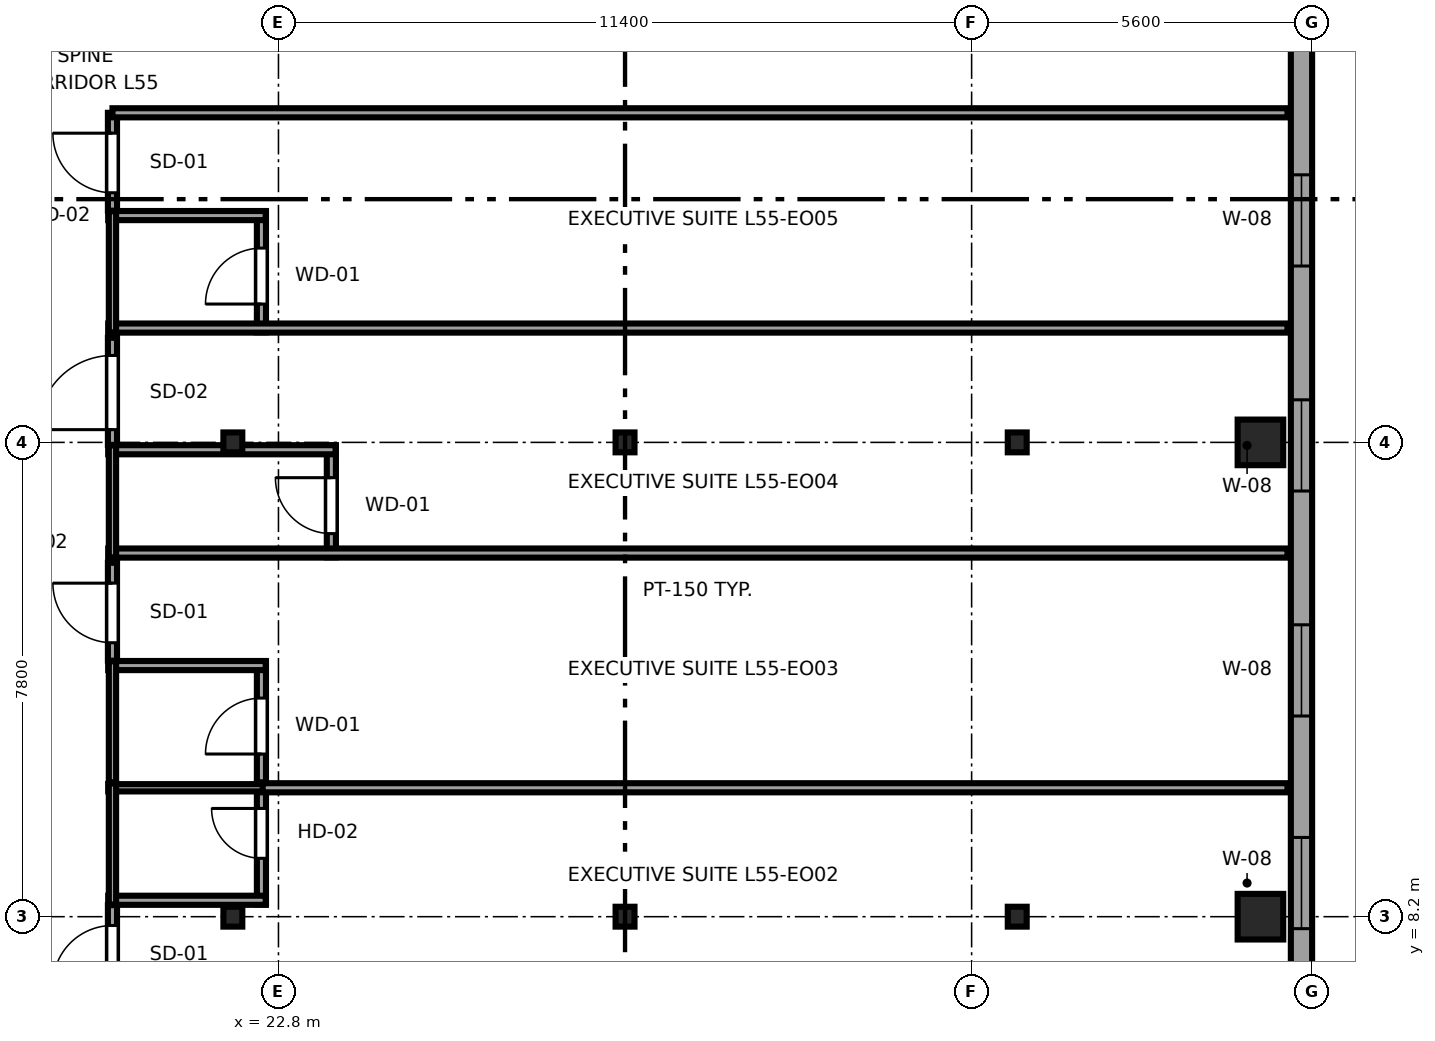
"""IFC4 building model, lengths in metres.
Left out: names, types, materials, properties, quantities, classifications, styles, units other than length and angle.
Written with IfcOpenShell. Run it as: python <this file> out.ifc"""

import sys

from ifc_helpers import new_model, si_unit, direction, frame, frame_2d, origin, origin_2d, place, context, subcontext, project, spatial, rectangle, i_section, extrude, source, transform, mapped, element, fill, save


model = new_model("IFC4")
c1 = context("Model", 3, precision=1e-05, world=origin(), true_north=direction((0.0, 1.0)))
c2 = subcontext(c1, "Body", "Model", "MODEL_VIEW")
j1 = project(units=[si_unit("LENGTHUNIT", "METRE"), si_unit("PLANEANGLEUNIT", "RADIAN")], contexts=[c1])
p1 = place(None, origin())
s1 = spatial("IfcSite", under=j1, at=p1, CompositionType="ELEMENT")
p2 = place(p1, origin())
s2 = spatial("IfcBuilding", under=s1, at=p2, CompositionType="ELEMENT")
p3 = place(p2, frame((0.0, 0.0, 209.7)))
s3 = spatial("IfcBuildingStorey", under=s2, at=p3, CompositionType="ELEMENT", Elevation=209.7)
m1 = source(origin(), c2, "Body", "SweptSolid", [
    extrude(i_section(OverallWidth=0.311, OverallDepth=0.327, WebThickness=0.016, FlangeThickness=0.025, FilletRadius=0.017, at=origin_2d()), origin(), (0.0, 0.0, 1.0), 3.55),
])
for number, where, z_axis, x_axis in (
    (1, (22.05, 8.2, 0.0), (0.0, 0.0, 1.0), (1.0, 0.0, 0.0)),
    (2, (22.05, 16.0, 0.0), (0.0, 0.0, 1.0), (1.0, 0.0, 0.0)),
    (3, (28.5, 8.2, 0.0), (0.0, 0.0, 1.0), (1.0, 0.0, 0.0)),
    (4, (28.5, 16.0, 0.0), (0.0, 0.0, 1.0), (1.0, 0.0, 0.0)),
    (5, (34.95, 8.2, 0.0), (0.0, 0.0, 1.0), (1.0, 0.0, 0.0)),
    (6, (34.95, 16.0, 0.0), (0.0, 0.0, 1.0), (1.0, 0.0, 0.0)),
):
    element("IfcColumn", number, at=place(p3, frame(where, z_axis=z_axis, x_axis=x_axis)), inside=s3, PredefinedType="COLUMN", context=c2, shape_type="MappedRepresentation", body=[
        mapped(m1, transform((0.0, 0.0, 0.0), x_axis=(1.0, 0.0, 0.0), y_axis=(0.0, 1.0, 0.0), z_axis=(0.0, 0.0, 1.0), scale=1.0)),
    ])
m2 = source(origin(), c2, "Body", "SweptSolid", [
    extrude(rectangle(XDim=0.75, YDim=0.75, at=origin_2d()), origin(), (0.0, 0.0, 1.0), 3.55),
])
for number, where, z_axis, x_axis in (
    (7, (38.95, 8.2, 0.0), (0.0, 0.0, 1.0), (1.0, 0.0, 0.0)),
    (8, (38.95, 16.0, 0.0), (0.0, 0.0, 1.0), (1.0, 0.0, 0.0)),
):
    element("IfcColumn", number, at=place(p3, frame(where, z_axis=z_axis, x_axis=x_axis)), inside=s3, PredefinedType="COLUMN", context=c2, shape_type="MappedRepresentation", body=[
        mapped(m2, transform((0.0, 0.0, 0.0), x_axis=(1.0, 0.0, 0.0), y_axis=(0.0, 1.0, 0.0), z_axis=(0.0, 0.0, 1.0), scale=1.0)),
    ])
p4 = place(p3, frame((39.625, 7.017, 0.0), z_axis=(0.0, 0.0, 1.0), x_axis=(0.0, 1.0, 0.0)))
e9 = element("IfcWall", 9, at=p4, inside=s3, PredefinedType="SOLIDWALL", context=c2, shape_type="SweptSolid", body=[
    extrude(rectangle(XDim=24.579, YDim=0.35, at=frame_2d((12.29, 0.0))), origin(), (0.0, 0.0, 1.0), 3.37),
])
p5 = place(p4, frame((20.291, 0.0, 0.68)))
e10 = element("IfcOpeningElement", 10, at=p5, cuts=e9, PredefinedType="OPENING", context=c2, shape_type="SweptSolid", body=[
    extrude(rectangle(XDim=2.7, YDim=1.95, at=frame_2d((1.35, 0.975))), frame((0.0, 0.185, 0.0), z_axis=(0.0, -1.0, 0.0), x_axis=(1.0, 0.0, 0.0)), (0.0, 0.0, 1.0), 0.37),
])
p6 = place(p4, frame((0.986, 0.0, 0.62)))
e11 = element("IfcOpeningElement", 11, at=p6, cuts=e9, PredefinedType="OPENING", context=c2, shape_type="SweptSolid", body=[
    extrude(rectangle(XDim=1.5, YDim=1.55, at=frame_2d((0.75, 0.775))), frame((0.0, 0.185, 0.0), z_axis=(0.0, -1.0, 0.0), x_axis=(1.0, 0.0, 0.0)), (0.0, 0.0, 1.0), 0.37),
])
p7 = place(p4, frame((4.483, 0.0, 0.62)))
e12 = element("IfcOpeningElement", 12, at=p7, cuts=e9, PredefinedType="OPENING", context=c2, shape_type="SweptSolid", body=[
    extrude(rectangle(XDim=1.5, YDim=1.55, at=frame_2d((0.75, 0.775))), frame((0.0, 0.185, 0.0), z_axis=(0.0, -1.0, 0.0), x_axis=(1.0, 0.0, 0.0)), (0.0, 0.0, 1.0), 0.37),
])
p8 = place(p4, frame((8.183, 0.0, 0.62)))
e13 = element("IfcOpeningElement", 13, at=p8, cuts=e9, PredefinedType="OPENING", context=c2, shape_type="SweptSolid", body=[
    extrude(rectangle(XDim=1.5, YDim=1.55, at=frame_2d((0.75, 0.775))), frame((0.0, 0.185, 0.0), z_axis=(0.0, -1.0, 0.0), x_axis=(1.0, 0.0, 0.0)), (0.0, 0.0, 1.0), 0.37),
])
p9 = place(p4, frame((11.883, 0.0, 0.62)))
e14 = element("IfcOpeningElement", 14, at=p9, cuts=e9, PredefinedType="OPENING", context=c2, shape_type="SweptSolid", body=[
    extrude(rectangle(XDim=1.5, YDim=1.55, at=frame_2d((0.75, 0.775))), frame((0.0, 0.185, 0.0), z_axis=(0.0, -1.0, 0.0), x_axis=(1.0, 0.0, 0.0)), (0.0, 0.0, 1.0), 0.37),
])
p10 = place(p3, frame((22.52, 8.4, 0.0), z_axis=(0.0, 0.0, 1.0), x_axis=(0.0, 1.0, 0.0)))
e15 = element("IfcWall", 15, at=p10, inside=s3, PredefinedType="PARTITIONING", context=c2, shape_type="SweptSolid", body=[
    extrude(rectangle(XDim=1.99, YDim=0.15, at=frame_2d((0.995, 0.0))), origin(), (0.0, 0.0, 1.0), 3.37),
])
p11 = place(p10, frame((0.76, 0.0, 0.0)))
e16 = element("IfcOpeningElement", 16, at=p11, cuts=e15, PredefinedType="OPENING", context=c2, shape_type="SweptSolid", body=[
    extrude(rectangle(XDim=0.82, YDim=2.01, at=frame_2d((0.41, 1.005))), frame((0.0, 0.085, 0.0), z_axis=(0.0, -1.0, 0.0), x_axis=(1.0, 0.0, 0.0)), (0.0, 0.0, 1.0), 0.17),
])
p12 = place(p3, frame((20.0, 8.47, 0.0), z_axis=(0.0, 0.0, 1.0), x_axis=(1.0, 0.0, 0.0)))
e17 = element("IfcWall", 17, at=p12, inside=s3, PredefinedType="PARTITIONING", context=c2, shape_type="SweptSolid", body=[
    extrude(rectangle(XDim=2.59, YDim=0.15, at=frame_2d((1.295, 0.0))), origin(), (0.0, 0.0, 1.0), 3.37),
])
p13 = place(p3, frame((20.0, 10.32, 0.0), z_axis=(0.0, 0.0, 1.0), x_axis=(1.0, 0.0, 0.0)))
e18 = element("IfcWall", 18, at=p13, inside=s3, PredefinedType="PLUMBINGWALL", context=c2, shape_type="SweptSolid", body=[
    extrude(rectangle(XDim=2.59, YDim=0.12, at=frame_2d((1.295, 0.0))), origin(), (0.0, 0.0, 1.0), 3.37),
])
p14 = place(p3, frame((20.07, 8.4, 0.0), z_axis=(0.0, 0.0, 1.0), x_axis=(0.0, 1.0, 0.0)))
e19 = element("IfcWall", 19, at=p14, inside=s3, PredefinedType="PLUMBINGWALL", context=c2, shape_type="SweptSolid", body=[
    extrude(rectangle(XDim=1.99, YDim=0.12, at=frame_2d((0.995, 0.0))), origin(), (0.0, 0.0, 1.0), 3.37),
])
p15 = place(p3, frame((22.52, 10.41, 0.0), z_axis=(0.0, 0.0, 1.0), x_axis=(0.0, 1.0, 0.0)))
e20 = element("IfcWall", 20, at=p15, inside=s3, PredefinedType="PARTITIONING", context=c2, shape_type="SweptSolid", body=[
    extrude(rectangle(XDim=1.99, YDim=0.15, at=frame_2d((0.995, 0.0))), origin(), (0.0, 0.0, 1.0), 3.37),
])
p16 = place(p15, frame((0.465, 0.0, 0.0)))
e21 = element("IfcOpeningElement", 21, at=p16, cuts=e20, PredefinedType="OPENING", context=c2, shape_type="SweptSolid", body=[
    extrude(rectangle(XDim=0.92, YDim=2.01, at=frame_2d((0.46, 1.005))), frame((0.0, 0.085, 0.0), z_axis=(0.0, -1.0, 0.0), x_axis=(1.0, 0.0, 0.0)), (0.0, 0.0, 1.0), 0.17),
])
p17 = place(p3, frame((20.0, 12.33, 0.0), z_axis=(0.0, 0.0, 1.0), x_axis=(1.0, 0.0, 0.0)))
e22 = element("IfcWall", 22, at=p17, inside=s3, PredefinedType="PARTITIONING", context=c2, shape_type="SweptSolid", body=[
    extrude(rectangle(XDim=2.59, YDim=0.15, at=frame_2d((1.295, 0.0))), origin(), (0.0, 0.0, 1.0), 3.37),
])
p18 = place(p3, frame((20.07, 10.41, 0.0), z_axis=(0.0, 0.0, 1.0), x_axis=(0.0, 1.0, 0.0)))
e23 = element("IfcWall", 23, at=p18, inside=s3, PredefinedType="PLUMBINGWALL", context=c2, shape_type="SweptSolid", body=[
    extrude(rectangle(XDim=1.99, YDim=0.12, at=frame_2d((0.995, 0.0))), origin(), (0.0, 0.0, 1.0), 3.37),
])
p19 = place(p3, frame((23.67, 14.11, 0.0), z_axis=(0.0, 0.0, 1.0), x_axis=(0.0, 1.0, 0.0)))
e24 = element("IfcWall", 24, at=p19, inside=s3, PredefinedType="PARTITIONING", context=c2, shape_type="SweptSolid", body=[
    extrude(rectangle(XDim=1.839, YDim=0.15, at=frame_2d((0.919, 0.0))), origin(), (0.0, 0.0, 1.0), 3.37),
])
p20 = place(p19, frame((0.389, 0.0, 0.0)))
e25 = element("IfcOpeningElement", 25, at=p20, cuts=e24, PredefinedType="OPENING", context=c2, shape_type="SweptSolid", body=[
    extrude(rectangle(XDim=0.92, YDim=2.01, at=frame_2d((0.46, 1.005))), frame((0.0, 0.085, 0.0), z_axis=(0.0, -1.0, 0.0), x_axis=(1.0, 0.0, 0.0)), (0.0, 0.0, 1.0), 0.17),
])
p21 = place(p3, frame((20.0, 14.18, 0.0), z_axis=(0.0, 0.0, 1.0), x_axis=(1.0, 0.0, 0.0)))
e26 = element("IfcWall", 26, at=p21, inside=s3, PredefinedType="PARTITIONING", context=c2, shape_type="SweptSolid", body=[
    extrude(rectangle(XDim=19.395, YDim=0.15, at=frame_2d((9.698, 0.0))), origin(), (0.0, 0.0, 1.0), 3.37),
])
p22 = place(p3, frame((20.0, 15.879, 0.0), z_axis=(0.0, 0.0, 1.0), x_axis=(1.0, 0.0, 0.0)))
e27 = element("IfcWall", 27, at=p22, inside=s3, PredefinedType="PARTITIONING", context=c2, shape_type="SweptSolid", body=[
    extrude(rectangle(XDim=3.74, YDim=0.15, at=frame_2d((1.87, 0.0))), origin(), (0.0, 0.0, 1.0), 2.758),
])
p23 = place(p3, frame((20.07, 14.11, 0.0), z_axis=(0.0, 0.0, 1.0), x_axis=(0.0, 1.0, 0.0)))
e28 = element("IfcWall", 28, at=p23, inside=s3, PredefinedType="PLUMBINGWALL", context=c2, shape_type="SweptSolid", body=[
    extrude(rectangle(XDim=1.839, YDim=0.12, at=frame_2d((0.919, 0.0))), origin(), (0.0, 0.0, 1.0), 3.37),
])
p24 = place(p3, frame((22.52, 17.81, 0.0), z_axis=(0.0, 0.0, 1.0), x_axis=(0.0, 1.0, 0.0)))
e29 = element("IfcWall", 29, at=p24, inside=s3, PredefinedType="PARTITIONING", context=c2, shape_type="SweptSolid", body=[
    extrude(rectangle(XDim=1.99, YDim=0.15, at=frame_2d((0.995, 0.0))), origin(), (0.0, 0.0, 1.0), 3.37),
])
p25 = place(p24, frame((0.465, 0.0, 0.0)))
e30 = element("IfcOpeningElement", 30, at=p25, cuts=e29, PredefinedType="OPENING", context=c2, shape_type="SweptSolid", body=[
    extrude(rectangle(XDim=0.92, YDim=2.01, at=frame_2d((0.46, 1.005))), frame((0.0, 0.085, 0.0), z_axis=(0.0, -1.0, 0.0), x_axis=(1.0, 0.0, 0.0)), (0.0, 0.0, 1.0), 0.17),
])
p26 = place(p3, frame((20.0, 17.88, 0.0), z_axis=(0.0, 0.0, 1.0), x_axis=(1.0, 0.0, 0.0)))
e31 = element("IfcWall", 31, at=p26, inside=s3, PredefinedType="PARTITIONING", context=c2, shape_type="SweptSolid", body=[
    extrude(rectangle(XDim=19.395, YDim=0.15, at=frame_2d((9.698, 0.0))), origin(), (0.0, 0.0, 1.0), 3.37),
])
p27 = place(p3, frame((20.0, 19.73, 0.0), z_axis=(0.0, 0.0, 1.0), x_axis=(1.0, 0.0, 0.0)))
e32 = element("IfcWall", 32, at=p27, inside=s3, PredefinedType="PARTITIONING", context=c2, shape_type="SweptSolid", body=[
    extrude(rectangle(XDim=2.59, YDim=0.15, at=frame_2d((1.295, 0.0))), origin(), (0.0, 0.0, 1.0), 3.37),
])
p28 = place(p3, frame((20.07, 17.81, 0.0), z_axis=(0.0, 0.0, 1.0), x_axis=(0.0, 1.0, 0.0)))
e33 = element("IfcWall", 33, at=p28, inside=s3, PredefinedType="PLUMBINGWALL", context=c2, shape_type="SweptSolid", body=[
    extrude(rectangle(XDim=1.99, YDim=0.12, at=frame_2d((0.995, 0.0))), origin(), (0.0, 0.0, 1.0), 3.37),
])
p29 = place(p3, frame((20.07, 6.78, 0.0), z_axis=(0.0, 0.0, 1.0), x_axis=(0.0, 1.0, 0.0)))
e34 = element("IfcWall", 34, at=p29, inside=s3, PredefinedType="PARTITIONING", context=c2, shape_type="SweptSolid", body=[
    extrude(rectangle(XDim=1.61, YDim=0.15, at=frame_2d((0.805, 0.0))), origin(), (0.0, 0.0, 1.0), 3.37),
])
p30 = place(p29, frame((0.295, 0.0, 0.0)))
e35 = element("IfcOpeningElement", 35, at=p30, cuts=e34, PredefinedType="OPENING", context=c2, shape_type="SweptSolid", body=[
    extrude(rectangle(XDim=0.98, YDim=2.12, at=frame_2d((0.49, 1.06))), frame((0.0, 0.085, 0.0), z_axis=(0.0, -1.0, 0.0), x_axis=(1.0, 0.0, 0.0)), (0.0, 0.0, 1.0), 0.17),
])
p31 = place(p3, frame((22.54, 10.32, 0.0), z_axis=(0.0, 0.0, 1.0), x_axis=(1.0, 0.0, 0.0)))
e36 = element("IfcWall", 36, at=p31, inside=s3, PredefinedType="PARTITIONING", context=c2, shape_type="SweptSolid", body=[
    extrude(rectangle(XDim=16.855, YDim=0.15, at=frame_2d((8.427, 0.0))), origin(), (0.0, 0.0, 1.0), 3.37),
])
p32 = place(p3, frame((20.07, 12.41, 0.0), z_axis=(0.0, 0.0, 1.0), x_axis=(0.0, 1.0, 0.0)))
e37 = element("IfcWall", 37, at=p32, inside=s3, PredefinedType="PARTITIONING", context=c2, shape_type="SweptSolid", body=[
    extrude(rectangle(XDim=1.61, YDim=0.15, at=frame_2d((0.805, 0.0))), origin(), (0.0, 0.0, 1.0), 3.37),
])
p33 = place(p32, frame((0.295, 0.0, 0.0)))
e38 = element("IfcOpeningElement", 38, at=p33, cuts=e37, PredefinedType="OPENING", context=c2, shape_type="SweptSolid", body=[
    extrude(rectangle(XDim=0.98, YDim=2.12, at=frame_2d((0.49, 1.06))), frame((0.0, 0.085, 0.0), z_axis=(0.0, -1.0, 0.0), x_axis=(1.0, 0.0, 0.0)), (0.0, 0.0, 1.0), 0.17),
])
p34 = place(p3, frame((20.07, 15.959, 0.0), z_axis=(0.0, 0.0, 1.0), x_axis=(0.0, 1.0, 0.0)))
e39 = element("IfcWall", 39, at=p34, inside=s3, PredefinedType="PARTITIONING", context=c2, shape_type="SweptSolid", body=[
    extrude(rectangle(XDim=1.761, YDim=0.15, at=frame_2d((0.88, 0.0))), origin(), (0.0, 0.0, 1.0), 3.37),
])
p35 = place(p34, frame((0.25, 0.0, 0.0)))
e40 = element("IfcOpeningElement", 40, at=p35, cuts=e39, PredefinedType="OPENING", context=c2, shape_type="SweptSolid", body=[
    extrude(rectangle(XDim=1.22, YDim=2.08, at=frame_2d((0.61, 1.04))), frame((0.0, 0.085, 0.0), z_axis=(0.0, -1.0, 0.0), x_axis=(1.0, 0.0, 0.0)), (0.0, 0.0, 1.0), 0.17),
])
p36 = place(p3, frame((20.07, 19.81, 0.0), z_axis=(0.0, 0.0, 1.0), x_axis=(0.0, 1.0, 0.0)))
e41 = element("IfcWall", 41, at=p36, inside=s3, PredefinedType="PARTITIONING", context=c2, shape_type="SweptSolid", body=[
    extrude(rectangle(XDim=1.61, YDim=0.15, at=frame_2d((0.805, 0.0))), origin(), (0.0, 0.0, 1.0), 3.37),
])
p37 = place(p36, frame((0.295, 0.0, 0.0)))
e42 = element("IfcOpeningElement", 42, at=p37, cuts=e41, PredefinedType="OPENING", context=c2, shape_type="SweptSolid", body=[
    extrude(rectangle(XDim=0.98, YDim=2.12, at=frame_2d((0.49, 1.06))), frame((0.0, 0.085, 0.0), z_axis=(0.0, -1.0, 0.0), x_axis=(1.0, 0.0, 0.0)), (0.0, 0.0, 1.0), 0.17),
])
p38 = place(p3, frame((20.07, 21.42, 0.0), z_axis=(0.0, 0.0, 1.0), x_axis=(1.0, 0.0, 0.0)))
e43 = element("IfcWall", 43, at=p38, inside=s3, PredefinedType="PARTITIONING", context=c2, shape_type="SweptSolid", body=[
    extrude(rectangle(XDim=19.325, YDim=0.15, at=frame_2d((9.663, 0.0))), origin(), (0.0, 0.0, 1.0), 3.37),
])
m3 = source(origin(), c2, "Body", "SweptSolid", [
    extrude(rectangle(XDim=1.5, YDim=1.55, at=frame_2d((0.75, 0.775))), frame((0.0, 0.09, 0.0), z_axis=(0.0, -1.0, 0.0), x_axis=(1.0, 0.0, 0.0)), (0.0, 0.0, 1.0), 0.06),
])
p39 = place(p6, origin())
e44 = element("IfcWindow", 44, at=p39, inside=s3, PartitioningType="SINGLE_PANEL", PredefinedType="WINDOW", context=c2, shape_type="MappedRepresentation", body=[
    mapped(m3, transform((0.0, 0.0, 0.0), x_axis=(1.0, 0.0, 0.0), y_axis=(0.0, 1.0, 0.0), z_axis=(0.0, 0.0, 1.0), scale=1.0)),
])
fill(e11, e44)
p40 = place(p7, origin())
e45 = element("IfcWindow", 45, at=p40, inside=s3, PartitioningType="SINGLE_PANEL", PredefinedType="WINDOW", context=c2, shape_type="MappedRepresentation", body=[
    mapped(m3, transform((0.0, 0.0, 0.0), x_axis=(1.0, 0.0, 0.0), y_axis=(0.0, 1.0, 0.0), z_axis=(0.0, 0.0, 1.0), scale=1.0)),
])
fill(e12, e45)
p41 = place(p8, origin())
e46 = element("IfcWindow", 46, at=p41, inside=s3, PartitioningType="SINGLE_PANEL", PredefinedType="WINDOW", context=c2, shape_type="MappedRepresentation", body=[
    mapped(m3, transform((0.0, 0.0, 0.0), x_axis=(1.0, 0.0, 0.0), y_axis=(0.0, 1.0, 0.0), z_axis=(0.0, 0.0, 1.0), scale=1.0)),
])
fill(e13, e46)
p42 = place(p9, origin())
e47 = element("IfcWindow", 47, at=p42, inside=s3, PartitioningType="SINGLE_PANEL", PredefinedType="WINDOW", context=c2, shape_type="MappedRepresentation", body=[
    mapped(m3, transform((0.0, 0.0, 0.0), x_axis=(1.0, 0.0, 0.0), y_axis=(0.0, 1.0, 0.0), z_axis=(0.0, 0.0, 1.0), scale=1.0)),
])
fill(e14, e47)
m4 = source(origin(), c2, "Body", "SweptSolid", [
    extrude(rectangle(XDim=0.82, YDim=2.01, at=frame_2d((0.41, 1.005))), frame((0.0, 0.025, 0.0), z_axis=(0.0, -1.0, 0.0), x_axis=(1.0, 0.0, 0.0)), (0.0, 0.0, 1.0), 0.05),
])
p43 = place(p11, origin())
e48 = element("IfcDoor", 48, at=p43, inside=s3, OperationType="SINGLE_SWING_RIGHT", PredefinedType="DOOR", context=c2, shape_type="MappedRepresentation", body=[
    mapped(m4, transform((0.0, 0.0, 0.0), x_axis=(1.0, 0.0, 0.0), y_axis=(0.0, 1.0, 0.0), z_axis=(0.0, 0.0, 1.0), scale=1.0)),
])
fill(e16, e48)
m5 = source(origin(), c2, "Body", "SweptSolid", [
    extrude(rectangle(XDim=0.92, YDim=2.01, at=frame_2d((0.46, 1.005))), frame((0.0, 0.025, 0.0), z_axis=(0.0, -1.0, 0.0), x_axis=(1.0, 0.0, 0.0)), (0.0, 0.0, 1.0), 0.05),
])
p44 = place(p16, origin())
e49 = element("IfcDoor", 49, at=p44, inside=s3, OperationType="SINGLE_SWING_LEFT", PredefinedType="DOOR", context=c2, shape_type="MappedRepresentation", body=[
    mapped(m5, transform((0.0, 0.0, 0.0), x_axis=(1.0, 0.0, 0.0), y_axis=(0.0, 1.0, 0.0), z_axis=(0.0, 0.0, 1.0), scale=1.0)),
])
fill(e21, e49)
p45 = place(p20, origin())
e50 = element("IfcDoor", 50, at=p45, inside=s3, OperationType="SINGLE_SWING_RIGHT", PredefinedType="DOOR", context=c2, shape_type="MappedRepresentation", body=[
    mapped(m5, transform((0.0, 0.0, 0.0), x_axis=(1.0, 0.0, 0.0), y_axis=(0.0, 1.0, 0.0), z_axis=(0.0, 0.0, 1.0), scale=1.0)),
])
fill(e25, e50)
p46 = place(p25, origin())
e51 = element("IfcDoor", 51, at=p46, inside=s3, OperationType="SINGLE_SWING_LEFT", PredefinedType="DOOR", context=c2, shape_type="MappedRepresentation", body=[
    mapped(m5, transform((0.0, 0.0, 0.0), x_axis=(1.0, 0.0, 0.0), y_axis=(0.0, 1.0, 0.0), z_axis=(0.0, 0.0, 1.0), scale=1.0)),
])
fill(e30, e51)
m6 = source(origin(), c2, "Body", "SweptSolid", [
    extrude(rectangle(XDim=0.98, YDim=2.12, at=frame_2d((0.49, 1.06))), frame((0.0, 0.025, 0.0), z_axis=(0.0, -1.0, 0.0), x_axis=(1.0, 0.0, 0.0)), (0.0, 0.0, 1.0), 0.05),
])
p47 = place(p30, origin())
e52 = element("IfcDoor", 52, at=p47, inside=s3, OperationType="SINGLE_SWING_LEFT", PredefinedType="DOOR", context=c2, shape_type="MappedRepresentation", body=[
    mapped(m6, transform((0.0, 0.0, 0.0), x_axis=(1.0, 0.0, 0.0), y_axis=(0.0, 1.0, 0.0), z_axis=(0.0, 0.0, 1.0), scale=1.0)),
])
fill(e35, e52)
p48 = place(p33, origin())
e53 = element("IfcDoor", 53, at=p48, inside=s3, OperationType="SINGLE_SWING_RIGHT", PredefinedType="DOOR", context=c2, shape_type="MappedRepresentation", body=[
    mapped(m6, transform((0.0, 0.0, 0.0), x_axis=(1.0, 0.0, 0.0), y_axis=(0.0, 1.0, 0.0), z_axis=(0.0, 0.0, 1.0), scale=1.0)),
])
fill(e38, e53)
m7 = source(origin(), c2, "Body", "SweptSolid", [
    extrude(rectangle(XDim=1.22, YDim=2.08, at=frame_2d((0.61, 1.04))), frame((0.0, 0.025, 0.0), z_axis=(0.0, -1.0, 0.0), x_axis=(1.0, 0.0, 0.0)), (0.0, 0.0, 1.0), 0.05),
])
p49 = place(p35, origin())
e54 = element("IfcDoor", 54, at=p49, inside=s3, OperationType="SINGLE_SWING_LEFT", PredefinedType="DOOR", context=c2, shape_type="MappedRepresentation", body=[
    mapped(m7, transform((0.0, 0.0, 0.0), x_axis=(1.0, 0.0, 0.0), y_axis=(0.0, 1.0, 0.0), z_axis=(0.0, 0.0, 1.0), scale=1.0)),
])
fill(e40, e54)
p50 = place(p37, origin())
e55 = element("IfcDoor", 55, at=p50, inside=s3, OperationType="SINGLE_SWING_RIGHT", PredefinedType="DOOR", context=c2, shape_type="MappedRepresentation", body=[
    mapped(m6, transform((0.0, 0.0, 0.0), x_axis=(1.0, 0.0, 0.0), y_axis=(0.0, 1.0, 0.0), z_axis=(0.0, 0.0, 1.0), scale=1.0)),
])
fill(e42, e55)
save(model, sys.argv[1])
